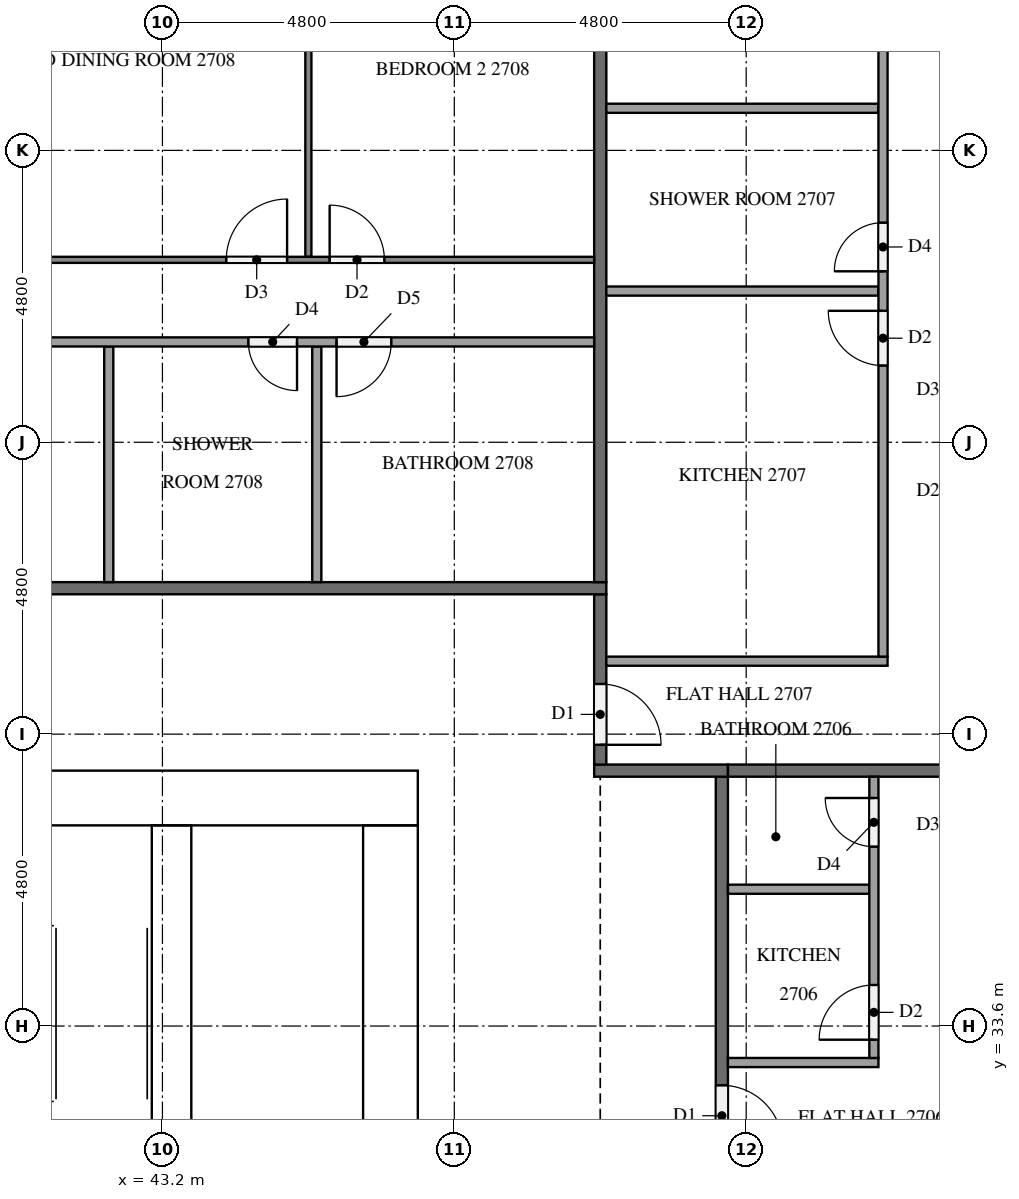
"""IFC4 building model, lengths in metres.
Left out: names, types, materials, properties, quantities, classifications, styles, units other than length and angle.
Written with IfcOpenShell. Run it as: python <this file> out.ifc"""

import sys

from ifc_helpers import new_model, si_unit, direction, frame, frame_2d, origin, place, context, subcontext, project, spatial, rectangle, extrude, element, fill, save


model = new_model("IFC4")
c1 = context("Model", 3, precision=1e-05, world=origin(), true_north=direction((0.0, 1.0)))
c2 = subcontext(c1, "Body", "Model", "MODEL_VIEW")
j1 = project(units=[si_unit("LENGTHUNIT", "METRE"), si_unit("PLANEANGLEUNIT", "RADIAN")], contexts=[c1])
p1 = place(None, origin())
s1 = spatial("IfcSite", under=j1, at=p1, CompositionType="ELEMENT")
p2 = place(p1, origin())
s2 = spatial("IfcBuilding", under=s1, at=p2, CompositionType="ELEMENT")
p3 = place(p2, frame((0.0, 0.0, 106.7)))
s3 = spatial("IfcBuildingStorey", under=s2, at=p3, CompositionType="ELEMENT", Elevation=106.7)
p4 = place(p3, frame((15.0, 37.35, 0.0), z_axis=(0.0, 0.0, 1.0), x_axis=(1.0, 0.0, 0.0)))
e1 = element("IfcWall", 1, at=p4, inside=s3, PredefinedType="SHEAR", context=c2, shape_type="SweptSolid", body=[
    extrude(rectangle(XDim=32.4, YDim=0.9, at=frame_2d((16.2, 0.0))), origin(), (0.0, 0.0, 1.0), 3.2),
])
p5 = place(p4, frame((15.3, 0.0, 0.0)))
e2 = element("IfcOpeningElement", 2, at=p5, cuts=e1, PredefinedType="OPENING", context=c2, shape_type="SweptSolid", body=[
    extrude(rectangle(XDim=1.8, YDim=2.1, at=frame_2d((0.9, 1.05))), frame((0.0, 0.46, 0.0), z_axis=(0.0, -1.0, 0.0), x_axis=(1.0, 0.0, 0.0)), (0.0, 0.0, 1.0), 0.92),
])
p6 = place(p4, frame((1.794, 0.0, 0.0)))
e3 = element("IfcOpeningElement", 3, at=p6, cuts=e1, PredefinedType="OPENING", context=c2, shape_type="SweptSolid", body=[
    extrude(rectangle(XDim=1.0, YDim=2.1, at=frame_2d((0.5, 1.05))), frame((0.0, 0.46, 0.0), z_axis=(0.0, -1.0, 0.0), x_axis=(1.0, 0.0, 0.0)), (0.0, 0.0, 1.0), 0.92),
])
p7 = place(p4, frame((5.331, 0.0, 0.0)))
e4 = element("IfcOpeningElement", 4, at=p7, cuts=e1, PredefinedType="OPENING", context=c2, shape_type="SweptSolid", body=[
    extrude(rectangle(XDim=1.0, YDim=2.1, at=frame_2d((0.5, 1.05))), frame((0.0, 0.46, 0.0), z_axis=(0.0, -1.0, 0.0), x_axis=(1.0, 0.0, 0.0)), (0.0, 0.0, 1.0), 0.92),
])
p8 = place(p3, frame((46.95, 15.9, 0.0), z_axis=(0.0, 0.0, 1.0), x_axis=(0.0, 1.0, 0.0)))
e5 = element("IfcWall", 5, at=p8, inside=s3, PredefinedType="SHEAR", context=c2, shape_type="SweptSolid", body=[
    extrude(rectangle(XDim=21.0, YDim=0.9, at=frame_2d((10.5, 0.0))), origin(), (0.0, 0.0, 1.0), 3.2),
])
p9 = place(p8, frame((10.2, 0.0, 0.0)))
e6 = element("IfcOpeningElement", 6, at=p9, cuts=e5, PredefinedType="OPENING", context=c2, shape_type="SweptSolid", body=[
    extrude(rectangle(XDim=1.2, YDim=2.1, at=frame_2d((0.6, 1.05))), frame((0.0, 0.46, 0.0), z_axis=(0.0, -1.0, 0.0), x_axis=(1.0, 0.0, 0.0)), (0.0, 0.0, 1.0), 0.92),
])
p10 = place(p3, frame((43.35, 27.75, 0.0), z_axis=(0.0, 0.0, 1.0), x_axis=(0.0, 1.0, 0.0)))
e7 = element("IfcWall", 7, at=p10, inside=s3, PredefinedType="SHEAR", context=c2, shape_type="SweptSolid", body=[
    extrude(rectangle(XDim=9.15, YDim=0.65, at=frame_2d((4.575, 0.0))), origin(), (0.0, 0.0, 1.0), 3.2),
])
p11 = place(p10, frame((7.65, 0.0, 0.0)))
e8 = element("IfcOpeningElement", 8, at=p11, cuts=e7, PredefinedType="OPENING", context=c2, shape_type="SweptSolid", body=[
    extrude(rectangle(XDim=1.2, YDim=2.1, at=frame_2d((0.6, 1.05))), frame((0.0, 0.335, 0.0), z_axis=(0.0, -1.0, 0.0), x_axis=(1.0, 0.0, 0.0)), (0.0, 0.0, 1.0), 0.67),
])
p12 = place(p3, frame((52.4, 37.7, 0.0), z_axis=(0.0, 0.0, 1.0), x_axis=(0.0, -1.0, 0.0)))
e9 = element("IfcWall", 9, at=p12, inside=s3, PredefinedType="PARTITIONING", context=c2, shape_type="SweptSolid", body=[
    extrude(rectangle(XDim=22.6, YDim=0.2, at=frame_2d((11.3, 0.0))), origin(), (0.0, 0.0, 1.0), 3.2),
])
p13 = place(p12, frame((6.925, 0.0, 0.0)))
e10 = element("IfcOpeningElement", 10, at=p13, cuts=e9, PredefinedType="OPENING", context=c2, shape_type="SweptSolid", body=[
    extrude(rectangle(XDim=1.0, YDim=2.1, at=frame_2d((0.5, 1.05))), frame((0.0, 0.11, 0.0), z_axis=(0.0, -1.0, 0.0), x_axis=(1.0, 0.0, 0.0)), (0.0, 0.0, 1.0), 0.22),
])
p14 = place(p12, frame((5.075, 0.0, 0.0)))
e11 = element("IfcOpeningElement", 11, at=p14, cuts=e9, PredefinedType="OPENING", context=c2, shape_type="SweptSolid", body=[
    extrude(rectangle(XDim=1.0, YDim=2.1, at=frame_2d((0.5, 1.05))), frame((0.0, 0.11, 0.0), z_axis=(0.0, -1.0, 0.0), x_axis=(1.0, 0.0, 0.0)), (0.0, 0.0, 1.0), 0.22),
])
p15 = place(p3, frame((52.5, 37.8, 0.0), z_axis=(0.0, 0.0, 1.0), x_axis=(-1.0, 0.0, 0.0)))
e12 = element("IfcWall", 12, at=p15, inside=s3, PredefinedType="PARTITIONING", context=c2, shape_type="SweptSolid", body=[
    extrude(rectangle(XDim=2.2, YDim=0.2, at=frame_2d((1.1, 0.0))), origin(), (0.0, 0.0, 1.0), 3.2),
])
p16 = place(p3, frame((50.4, 40.7, 0.0), z_axis=(0.0, 0.0, 1.0), x_axis=(0.0, -1.0, 0.0)))
e13 = element("IfcWall", 13, at=p16, inside=s3, PredefinedType="PARTITIONING", context=c2, shape_type="SweptSolid", body=[
    extrude(rectangle(XDim=2.8, YDim=0.2, at=frame_2d((1.4, 0.0))), origin(), (0.0, 0.0, 1.0), 3.2),
])
p17 = place(p16, frame((1.475, 0.0, 0.0)))
e14 = element("IfcOpeningElement", 14, at=p17, cuts=e13, PredefinedType="OPENING", context=c2, shape_type="SweptSolid", body=[
    extrude(rectangle(XDim=1.0, YDim=2.1, at=frame_2d((0.5, 1.05))), frame((0.0, 0.11, 0.0), z_axis=(0.0, -1.0, 0.0), x_axis=(1.0, 0.0, 0.0)), (0.0, 0.0, 1.0), 0.22),
])
p18 = place(p3, frame((11.9, 40.8, 0.0), z_axis=(0.0, 0.0, 1.0), x_axis=(1.0, 0.0, 0.0)))
e15 = element("IfcWall", 15, at=p18, inside=s3, PredefinedType="PARTITIONING", context=c2, shape_type="SweptSolid", body=[
    extrude(rectangle(XDim=38.6, YDim=0.2, at=frame_2d((19.3, 0.0))), origin(), (0.0, 0.0, 1.0), 3.2),
])
p19 = place(p18, frame((22.125, 0.0, 0.0)))
e16 = element("IfcOpeningElement", 16, at=p19, cuts=e15, PredefinedType="OPENING", context=c2, shape_type="SweptSolid", body=[
    extrude(rectangle(XDim=1.0, YDim=2.1, at=frame_2d((0.5, 1.05))), frame((0.0, 0.11, 0.0), z_axis=(0.0, -1.0, 0.0), x_axis=(1.0, 0.0, 0.0)), (0.0, 0.0, 1.0), 0.22),
])
p20 = place(p18, frame((20.275, 0.0, 0.0)))
e17 = element("IfcOpeningElement", 17, at=p20, cuts=e15, PredefinedType="OPENING", context=c2, shape_type="SweptSolid", body=[
    extrude(rectangle(XDim=1.0, YDim=2.1, at=frame_2d((0.5, 1.05))), frame((0.0, 0.11, 0.0), z_axis=(0.0, -1.0, 0.0), x_axis=(1.0, 0.0, 0.0)), (0.0, 0.0, 1.0), 0.22),
])
p21 = place(p18, frame((0.525, 0.0, 0.0)))
e18 = element("IfcOpeningElement", 18, at=p21, cuts=e15, PredefinedType="OPENING", context=c2, shape_type="SweptSolid", body=[
    extrude(rectangle(XDim=1.0, YDim=2.1, at=frame_2d((0.5, 1.05))), frame((0.0, 0.11, 0.0), z_axis=(0.0, -1.0, 0.0), x_axis=(1.0, 0.0, 0.0)), (0.0, 0.0, 1.0), 0.22),
])
p22 = place(p3, frame((52.5, 37.8, 0.0), z_axis=(0.0, 0.0, 1.0), x_axis=(1.0, 0.0, 0.0)))
e19 = element("IfcWall", 19, at=p22, inside=s3, PredefinedType="PARTITIONING", context=c2, shape_type="SweptSolid", body=[
    extrude(rectangle(XDim=9.475, YDim=0.2, at=frame_2d((4.738, 0.0))), origin(), (0.0, 0.0, 1.0), 3.2),
])
p23 = place(p3, frame((50.4, 40.9, 0.0), z_axis=(0.0, 0.0, 1.0), x_axis=(0.0, 1.0, 0.0)))
e20 = element("IfcWall", 20, at=p23, inside=s3, PredefinedType="PARTITIONING", context=c2, shape_type="SweptSolid", body=[
    extrude(rectangle(XDim=11.8, YDim=0.2, at=frame_2d((5.9, 0.0))), origin(), (0.0, 0.0, 1.0), 3.2),
])
p24 = place(p3, frame((52.5, 35.85, 0.0), z_axis=(0.0, 0.0, 1.0), x_axis=(1.0, 0.0, 0.0)))
e21 = element("IfcWall", 21, at=p24, inside=s3, PredefinedType="PARTITIONING", context=c2, shape_type="SweptSolid", body=[
    extrude(rectangle(XDim=2.325, YDim=0.15, at=frame_2d((1.163, 0.0))), origin(), (0.0, 0.0, 1.0), 3.2),
])
p25 = place(p3, frame((52.5, 33.0, 0.0), z_axis=(0.0, 0.0, 1.0), x_axis=(1.0, 0.0, 0.0)))
e22 = element("IfcWall", 22, at=p25, inside=s3, PredefinedType="PARTITIONING", context=c2, shape_type="SweptSolid", body=[
    extrude(rectangle(XDim=2.475, YDim=0.15, at=frame_2d((1.238, 0.0))), origin(), (0.0, 0.0, 1.0), 3.2),
])
p26 = place(p3, frame((54.9, 33.075, 0.0), z_axis=(0.0, 0.0, 1.0), x_axis=(0.0, 1.0, 0.0)))
e23 = element("IfcWall", 23, at=p26, inside=s3, PredefinedType="PARTITIONING", context=c2, shape_type="SweptSolid", body=[
    extrude(rectangle(XDim=4.625, YDim=0.15, at=frame_2d((2.312, 0.0))), origin(), (0.0, 0.0, 1.0), 3.2),
])
p27 = place(p26, frame((0.3, 0.0, 0.0)))
e24 = element("IfcOpeningElement", 24, at=p27, cuts=e23, PredefinedType="OPENING", context=c2, shape_type="SweptSolid", body=[
    extrude(rectangle(XDim=0.9, YDim=2.1, at=frame_2d((0.45, 1.05))), frame((0.0, 0.085, 0.0), z_axis=(0.0, -1.0, 0.0), x_axis=(1.0, 0.0, 0.0)), (0.0, 0.0, 1.0), 0.17),
])
p28 = place(p26, frame((3.475, 0.0, 0.0)))
e25 = element("IfcOpeningElement", 25, at=p28, cuts=e23, PredefinedType="OPENING", context=c2, shape_type="SweptSolid", body=[
    extrude(rectangle(XDim=0.8, YDim=2.1, at=frame_2d((0.4, 1.05))), frame((0.0, 0.085, 0.0), z_axis=(0.0, -1.0, 0.0), x_axis=(1.0, 0.0, 0.0)), (0.0, 0.0, 1.0), 0.17),
])
for number, where, z_axis, x_axis in (
    (26, (50.5, 45.687, 0.0), (0.0, 0.0, 1.0), (1.0, 0.0, 0.0)),
    (27, (50.5, 48.692, 0.0), (0.0, 0.0, 1.0), (1.0, 0.0, 0.0)),
):
    element("IfcWall", number, at=place(p3, frame(where, z_axis=z_axis, x_axis=x_axis)), inside=s3, PredefinedType="PARTITIONING", context=c2, shape_type="SweptSolid", body=[
        extrude(rectangle(XDim=4.475, YDim=0.15, at=frame_2d((2.238, 0.0))), origin(), (0.0, 0.0, 1.0), 3.2),
    ])
p29 = place(p3, frame((50.5, 39.6, 0.0), z_axis=(0.0, 0.0, 1.0), x_axis=(1.0, 0.0, 0.0)))
e28 = element("IfcWall", 28, at=p29, inside=s3, PredefinedType="PARTITIONING", context=c2, shape_type="SweptSolid", body=[
    extrude(rectangle(XDim=4.625, YDim=0.15, at=frame_2d((2.312, 0.0))), origin(), (0.0, 0.0, 1.0), 3.2),
])
p30 = place(p3, frame((55.05, 39.675, 0.0), z_axis=(0.0, 0.0, 1.0), x_axis=(0.0, 1.0, 0.0)))
e29 = element("IfcWall", 29, at=p30, inside=s3, PredefinedType="PARTITIONING", context=c2, shape_type="SweptSolid", body=[
    extrude(rectangle(XDim=13.025, YDim=0.15, at=frame_2d((6.512, 0.0))), origin(), (0.0, 0.0, 1.0), 3.2),
])
p31 = place(p30, frame((4.787, 0.0, 0.0)))
e30 = element("IfcOpeningElement", 30, at=p31, cuts=e29, PredefinedType="OPENING", context=c2, shape_type="SweptSolid", body=[
    extrude(rectangle(XDim=0.9, YDim=2.1, at=frame_2d((0.45, 1.05))), frame((0.0, 0.085, 0.0), z_axis=(0.0, -1.0, 0.0), x_axis=(1.0, 0.0, 0.0)), (0.0, 0.0, 1.0), 0.17),
])
p32 = place(p30, frame((6.336, 0.0, 0.0)))
e31 = element("IfcOpeningElement", 31, at=p32, cuts=e29, PredefinedType="OPENING", context=c2, shape_type="SweptSolid", body=[
    extrude(rectangle(XDim=0.8, YDim=2.1, at=frame_2d((0.4, 1.05))), frame((0.0, 0.085, 0.0), z_axis=(0.0, -1.0, 0.0), x_axis=(1.0, 0.0, 0.0)), (0.0, 0.0, 1.0), 0.17),
])
p33 = place(p30, frame((11.775, 0.0, 0.0)))
e32 = element("IfcOpeningElement", 32, at=p33, cuts=e29, PredefinedType="OPENING", context=c2, shape_type="SweptSolid", body=[
    extrude(rectangle(XDim=0.9, YDim=2.1, at=frame_2d((0.45, 1.05))), frame((0.0, 0.085, 0.0), z_axis=(0.0, -1.0, 0.0), x_axis=(1.0, 0.0, 0.0)), (0.0, 0.0, 1.0), 0.17),
])
p34 = place(p3, frame((45.6, 46.25, 0.0), z_axis=(0.0, 0.0, 1.0), x_axis=(0.0, 1.0, 0.0)))
e33 = element("IfcWall", 33, at=p34, inside=s3, PredefinedType="PARTITIONING", context=c2, shape_type="SweptSolid", body=[
    extrude(rectangle(XDim=6.45, YDim=0.1, at=frame_2d((3.225, 0.0))), origin(), (0.0, 0.0, 1.0), 3.2),
])
p35 = place(p3, frame((33.7, 46.2, 0.0), z_axis=(0.0, 0.0, 1.0), x_axis=(1.0, 0.0, 0.0)))
e34 = element("IfcWall", 34, at=p35, inside=s3, PredefinedType="PARTITIONING", context=c2, shape_type="SweptSolid", body=[
    extrude(rectangle(XDim=16.6, YDim=0.1, at=frame_2d((8.3, 0.0))), origin(), (0.0, 0.0, 1.0), 3.2),
])
p36 = place(p35, frame((0.3, 0.0, 0.0)))
e35 = element("IfcOpeningElement", 35, at=p36, cuts=e34, PredefinedType="OPENING", context=c2, shape_type="SweptSolid", body=[
    extrude(rectangle(XDim=0.9, YDim=2.1, at=frame_2d((0.45, 1.05))), frame((0.0, 0.06, 0.0), z_axis=(0.0, -1.0, 0.0), x_axis=(1.0, 0.0, 0.0)), (0.0, 0.0, 1.0), 0.12),
])
p37 = place(p35, frame((10.55, 0.0, 0.0)))
e36 = element("IfcOpeningElement", 36, at=p37, cuts=e34, PredefinedType="OPENING", context=c2, shape_type="SweptSolid", body=[
    extrude(rectangle(XDim=1.0, YDim=2.1, at=frame_2d((0.5, 1.05))), frame((0.0, 0.06, 0.0), z_axis=(0.0, -1.0, 0.0), x_axis=(1.0, 0.0, 0.0)), (0.0, 0.0, 1.0), 0.12),
])
p38 = place(p35, frame((12.25, 0.0, 0.0)))
e37 = element("IfcOpeningElement", 37, at=p38, cuts=e34, PredefinedType="OPENING", context=c2, shape_type="SweptSolid", body=[
    extrude(rectangle(XDim=0.9, YDim=2.1, at=frame_2d((0.45, 1.05))), frame((0.0, 0.06, 0.0), z_axis=(0.0, -1.0, 0.0), x_axis=(1.0, 0.0, 0.0)), (0.0, 0.0, 1.0), 0.12),
])
for number, where, z_axis, x_axis in (
    (38, (42.317, 40.9, 0.0), (0.0, 0.0, 1.0), (0.0, 1.0, 0.0)),
    (39, (45.739, 40.9, 0.0), (0.0, 0.0, 1.0), (0.0, 1.0, 0.0)),
):
    element("IfcWall", number, at=place(p3, frame(where, z_axis=z_axis, x_axis=x_axis)), inside=s3, PredefinedType="PARTITIONING", context=c2, shape_type="SweptSolid", body=[
        extrude(rectangle(XDim=3.875, YDim=0.15, at=frame_2d((1.938, 0.0))), origin(), (0.0, 0.0, 1.0), 3.2),
    ])
p39 = place(p3, frame((50.3, 44.85, 0.0), z_axis=(0.0, 0.0, 1.0), x_axis=(-1.0, 0.0, 0.0)))
e40 = element("IfcWall", 40, at=p39, inside=s3, PredefinedType="PARTITIONING", context=c2, shape_type="SweptSolid", body=[
    extrude(rectangle(XDim=14.825, YDim=0.15, at=frame_2d((7.413, 0.0))), origin(), (0.0, 0.0, 1.0), 3.2),
])
p40 = place(p39, frame((13.625, 0.0, 0.0)))
e41 = element("IfcOpeningElement", 41, at=p40, cuts=e40, PredefinedType="OPENING", context=c2, shape_type="SweptSolid", body=[
    extrude(rectangle(XDim=0.9, YDim=2.1, at=frame_2d((0.45, 1.05))), frame((0.0, 0.085, 0.0), z_axis=(0.0, -1.0, 0.0), x_axis=(1.0, 0.0, 0.0)), (0.0, 0.0, 1.0), 0.17),
])
p41 = place(p39, frame((4.886, 0.0, 0.0)))
e42 = element("IfcOpeningElement", 42, at=p41, cuts=e40, PredefinedType="OPENING", context=c2, shape_type="SweptSolid", body=[
    extrude(rectangle(XDim=0.8, YDim=2.1, at=frame_2d((0.4, 1.05))), frame((0.0, 0.085, 0.0), z_axis=(0.0, -1.0, 0.0), x_axis=(1.0, 0.0, 0.0)), (0.0, 0.0, 1.0), 0.17),
])
p42 = place(p39, frame((3.336, 0.0, 0.0)))
e43 = element("IfcOpeningElement", 43, at=p42, cuts=e40, PredefinedType="OPENING", context=c2, shape_type="SweptSolid", body=[
    extrude(rectangle(XDim=0.9, YDim=2.1, at=frame_2d((0.45, 1.05))), frame((0.0, 0.085, 0.0), z_axis=(0.0, -1.0, 0.0), x_axis=(1.0, 0.0, 0.0)), (0.0, 0.0, 1.0), 0.17),
])
p43 = place(p11, origin())
e44 = element("IfcDoor", 44, at=p43, inside=s3, OperationType="SINGLE_SWING_LEFT", PredefinedType="DOOR", context=c2, shape_type="SweptSolid", body=[
    extrude(rectangle(XDim=1.2, YDim=2.1, at=frame_2d((0.6, 1.05))), frame((0.0, 0.025, 0.0), z_axis=(0.0, -1.0, 0.0), x_axis=(1.0, 0.0, 0.0)), (0.0, 0.0, 1.0), 0.05),
])
fill(e8, e44)
p44 = place(p14, origin())
e45 = element("IfcDoor", 45, at=p44, inside=s3, OperationType="SINGLE_SWING_RIGHT", PredefinedType="DOOR", context=c2, shape_type="SweptSolid", body=[
    extrude(rectangle(XDim=1.0, YDim=2.1, at=frame_2d((0.5, 1.05))), frame((0.0, 0.025, 0.0), z_axis=(0.0, -1.0, 0.0), x_axis=(1.0, 0.0, 0.0)), (0.0, 0.0, 1.0), 0.05),
])
fill(e11, e45)
p45 = place(p17, origin())
e46 = element("IfcDoor", 46, at=p45, inside=s3, OperationType="SINGLE_SWING_RIGHT", PredefinedType="DOOR", context=c2, shape_type="SweptSolid", body=[
    extrude(rectangle(XDim=1.0, YDim=2.1, at=frame_2d((0.5, 1.05))), frame((0.0, 0.025, 0.0), z_axis=(0.0, -1.0, 0.0), x_axis=(1.0, 0.0, 0.0)), (0.0, 0.0, 1.0), 0.05),
])
fill(e14, e46)
p46 = place(p27, origin())
e47 = element("IfcDoor", 47, at=p46, inside=s3, OperationType="SINGLE_SWING_LEFT", PredefinedType="DOOR", context=c2, shape_type="SweptSolid", body=[
    extrude(rectangle(XDim=0.9, YDim=2.1, at=frame_2d((0.45, 1.05))), frame((0.0, 0.025, 0.0), z_axis=(0.0, -1.0, 0.0), x_axis=(1.0, 0.0, 0.0)), (0.0, 0.0, 1.0), 0.05),
])
fill(e24, e47)
p47 = place(p28, origin())
e48 = element("IfcDoor", 48, at=p47, inside=s3, OperationType="SINGLE_SWING_RIGHT", PredefinedType="DOOR", context=c2, shape_type="SweptSolid", body=[
    extrude(rectangle(XDim=0.8, YDim=2.1, at=frame_2d((0.4, 1.05))), frame((0.0, 0.025, 0.0), z_axis=(0.0, -1.0, 0.0), x_axis=(1.0, 0.0, 0.0)), (0.0, 0.0, 1.0), 0.05),
])
fill(e25, e48)
p48 = place(p31, origin())
e49 = element("IfcDoor", 49, at=p48, inside=s3, OperationType="SINGLE_SWING_RIGHT", PredefinedType="DOOR", context=c2, shape_type="SweptSolid", body=[
    extrude(rectangle(XDim=0.9, YDim=2.1, at=frame_2d((0.45, 1.05))), frame((0.0, 0.025, 0.0), z_axis=(0.0, -1.0, 0.0), x_axis=(1.0, 0.0, 0.0)), (0.0, 0.0, 1.0), 0.05),
])
fill(e30, e49)
p49 = place(p32, origin())
e50 = element("IfcDoor", 50, at=p49, inside=s3, OperationType="SINGLE_SWING_LEFT", PredefinedType="DOOR", context=c2, shape_type="SweptSolid", body=[
    extrude(rectangle(XDim=0.8, YDim=2.1, at=frame_2d((0.4, 1.05))), frame((0.0, 0.025, 0.0), z_axis=(0.0, -1.0, 0.0), x_axis=(1.0, 0.0, 0.0)), (0.0, 0.0, 1.0), 0.05),
])
fill(e31, e50)
p50 = place(p37, origin())
e51 = element("IfcDoor", 51, at=p50, inside=s3, OperationType="SINGLE_SWING_RIGHT", PredefinedType="DOOR", context=c2, shape_type="SweptSolid", body=[
    extrude(rectangle(XDim=1.0, YDim=2.1, at=frame_2d((0.5, 1.05))), frame((0.0, 0.025, 0.0), z_axis=(0.0, -1.0, 0.0), x_axis=(1.0, 0.0, 0.0)), (0.0, 0.0, 1.0), 0.05),
])
fill(e36, e51)
p51 = place(p38, origin())
e52 = element("IfcDoor", 52, at=p51, inside=s3, OperationType="SINGLE_SWING_LEFT", PredefinedType="DOOR", context=c2, shape_type="SweptSolid", body=[
    extrude(rectangle(XDim=0.9, YDim=2.1, at=frame_2d((0.45, 1.05))), frame((0.0, 0.025, 0.0), z_axis=(0.0, -1.0, 0.0), x_axis=(1.0, 0.0, 0.0)), (0.0, 0.0, 1.0), 0.05),
])
fill(e37, e52)
p52 = place(p41, origin())
e53 = element("IfcDoor", 53, at=p52, inside=s3, OperationType="SINGLE_SWING_LEFT", PredefinedType="DOOR", context=c2, shape_type="SweptSolid", body=[
    extrude(rectangle(XDim=0.8, YDim=2.1, at=frame_2d((0.4, 1.05))), frame((0.0, 0.025, 0.0), z_axis=(0.0, -1.0, 0.0), x_axis=(1.0, 0.0, 0.0)), (0.0, 0.0, 1.0), 0.05),
])
fill(e42, e53)
p53 = place(p42, origin())
e54 = element("IfcDoor", 54, at=p53, inside=s3, OperationType="SINGLE_SWING_RIGHT", PredefinedType="DOOR", context=c2, shape_type="SweptSolid", body=[
    extrude(rectangle(XDim=0.9, YDim=2.1, at=frame_2d((0.45, 1.05))), frame((0.0, 0.025, 0.0), z_axis=(0.0, -1.0, 0.0), x_axis=(1.0, 0.0, 0.0)), (0.0, 0.0, 1.0), 0.05),
])
fill(e43, e54)
save(model, sys.argv[1])
